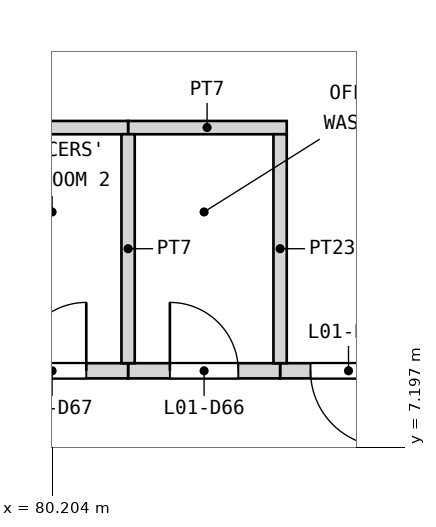
"""IFC4 building model, lengths in metres.
Left out: names, types, materials, properties, quantities, classifications, styles, units other than length and angle.
Written with IfcOpenShell. Run it as: python <this file> out.ifc"""

import sys

from ifc_helpers import new_model, si_unit, direction, frame, frame_2d, origin, place, context, subcontext, project, spatial, rectangle, extrude, element, fill, save


model = new_model("IFC4")
c1 = context("Model", 3, precision=1e-05, world=origin(), true_north=direction((0.0, 1.0)))
c2 = subcontext(c1, "Body", "Model", "MODEL_VIEW")
j1 = project(units=[si_unit("LENGTHUNIT", "METRE"), si_unit("PLANEANGLEUNIT", "RADIAN")], contexts=[c1])
p1 = place(None, origin())
s1 = spatial("IfcSite", under=j1, at=p1, CompositionType="ELEMENT")
p2 = place(p1, origin())
s2 = spatial("IfcBuilding", under=s1, at=p2, CompositionType="ELEMENT")
p3 = place(p2, frame((0.0, 0.0, 4.2)))
s3 = spatial("IfcBuildingStorey", under=s2, at=p3, CompositionType="ELEMENT", Elevation=4.2)
p4 = place(p3, frame((85.0, 8.2, 0.0), z_axis=(0.0, 0.0, 1.0), x_axis=(-1.0, 0.0, 0.0)))
e1 = element("IfcWall", 1, at=p4, inside=s3, PredefinedType="PARTITIONING", context=c2, shape_type="SweptSolid", body=[
    extrude(rectangle(XDim=1.8, YDim=0.2, at=frame_2d((0.9, 0.0))), origin(), (0.0, 0.0, 1.0), 3.9),
])
p5 = place(p4, frame((0.4, 0.0, 0.0)))
e2 = element("IfcOpeningElement", 2, at=p5, cuts=e1, PredefinedType="OPENING", context=c2, shape_type="SweptSolid", body=[
    extrude(rectangle(XDim=1.0, YDim=2.1, at=frame_2d((0.5, 1.05))), frame((0.0, 0.11, 0.0), z_axis=(0.0, -1.0, 0.0), x_axis=(1.0, 0.0, 0.0)), (0.0, 0.0, 1.0), 0.22),
])
p6 = place(p3, frame((83.2, 8.2, 0.0), z_axis=(0.0, 0.0, 1.0), x_axis=(-1.0, 0.0, 0.0)))
e3 = element("IfcWall", 3, at=p6, inside=s3, PredefinedType="PARTITIONING", context=c2, shape_type="SweptSolid", body=[
    extrude(rectangle(XDim=2.0, YDim=0.2, at=frame_2d((1.0, 0.0))), origin(), (0.0, 0.0, 1.0), 3.9),
])
p7 = place(p6, frame((0.55, 0.0, 0.0)))
e4 = element("IfcOpeningElement", 4, at=p7, cuts=e3, PredefinedType="OPENING", context=c2, shape_type="SweptSolid", body=[
    extrude(rectangle(XDim=0.9, YDim=2.1, at=frame_2d((0.45, 1.05))), frame((0.0, 0.11, 0.0), z_axis=(0.0, -1.0, 0.0), x_axis=(1.0, 0.0, 0.0)), (0.0, 0.0, 1.0), 0.22),
])
p8 = place(p3, frame((81.2, 8.2, 0.0), z_axis=(0.0, 0.0, 1.0), x_axis=(-1.0, 0.0, 0.0)))
e5 = element("IfcWall", 5, at=p8, inside=s3, PredefinedType="PARTITIONING", context=c2, shape_type="SweptSolid", body=[
    extrude(rectangle(XDim=2.0, YDim=0.2, at=frame_2d((1.0, 0.0))), origin(), (0.0, 0.0, 1.0), 3.9),
])
p9 = place(p8, frame((0.55, 0.0, 0.0)))
e6 = element("IfcOpeningElement", 6, at=p9, cuts=e5, PredefinedType="OPENING", context=c2, shape_type="SweptSolid", body=[
    extrude(rectangle(XDim=0.9, YDim=2.1, at=frame_2d((0.45, 1.05))), frame((0.0, 0.11, 0.0), z_axis=(0.0, -1.0, 0.0), x_axis=(1.0, 0.0, 0.0)), (0.0, 0.0, 1.0), 0.22),
])
p10 = place(p3, frame((83.288, 11.4, 0.0), z_axis=(0.0, 0.0, 1.0), x_axis=(-1.0, 0.0, 0.0)))
e7 = element("IfcWall", 7, at=p10, inside=s3, PredefinedType="PARTITIONING", context=c2, shape_type="SweptSolid", body=[
    extrude(rectangle(XDim=2.088, YDim=0.175, at=frame_2d((1.044, 0.0))), origin(), (0.0, 0.0, 1.0), 3.9),
])
p11 = place(p3, frame((81.2, 11.4, 0.0), z_axis=(0.0, 0.0, 1.0), x_axis=(-1.0, 0.0, 0.0)))
e8 = element("IfcWall", 8, at=p11, inside=s3, PredefinedType="PARTITIONING", context=c2, shape_type="SweptSolid", body=[
    extrude(rectangle(XDim=2.0, YDim=0.175, at=frame_2d((1.0, 0.0))), origin(), (0.0, 0.0, 1.0), 3.9),
])
p12 = place(p3, frame((83.2, 8.3, 0.0), z_axis=(0.0, 0.0, 1.0), x_axis=(0.0, 1.0, 0.0)))
e9 = element("IfcWall", 9, at=p12, inside=s3, PredefinedType="PARTITIONING", context=c2, shape_type="SweptSolid", body=[
    extrude(rectangle(XDim=3.012, YDim=0.175, at=frame_2d((1.506, 0.0))), origin(), (0.0, 0.0, 1.0), 2.9),
])
p13 = place(p3, frame((81.2, 8.3, 0.0), z_axis=(0.0, 0.0, 1.0), x_axis=(0.0, 1.0, 0.0)))
e10 = element("IfcWall", 10, at=p13, inside=s3, PredefinedType="PARTITIONING", context=c2, shape_type="SweptSolid", body=[
    extrude(rectangle(XDim=3.012, YDim=0.175, at=frame_2d((1.506, 0.0))), origin(), (0.0, 0.0, 1.0), 3.9),
])
p14 = place(p7, frame((0.9, 0.0, 0.0), z_axis=(0.0, 0.0, 1.0), x_axis=(-1.0, 0.0, 0.0)))
e11 = element("IfcDoor", 11, at=p14, inside=s3, OperationType="SINGLE_SWING_LEFT", PredefinedType="DOOR", context=c2, shape_type="SweptSolid", body=[
    extrude(rectangle(XDim=0.9, YDim=2.1, at=frame_2d((0.45, 1.05))), frame((0.0, 0.025, 0.0), z_axis=(0.0, -1.0, 0.0), x_axis=(1.0, 0.0, 0.0)), (0.0, 0.0, 1.0), 0.05),
])
fill(e4, e11)
p15 = place(p9, frame((0.9, 0.0, 0.0), z_axis=(0.0, 0.0, 1.0), x_axis=(-1.0, 0.0, 0.0)))
e12 = element("IfcDoor", 12, at=p15, inside=s3, OperationType="SINGLE_SWING_RIGHT", PredefinedType="DOOR", context=c2, shape_type="SweptSolid", body=[
    extrude(rectangle(XDim=0.9, YDim=2.1, at=frame_2d((0.45, 1.05))), frame((0.0, 0.025, 0.0), z_axis=(0.0, -1.0, 0.0), x_axis=(1.0, 0.0, 0.0)), (0.0, 0.0, 1.0), 0.05),
])
fill(e6, e12)
p16 = place(p5, origin())
e13 = element("IfcDoor", 13, at=p16, inside=s3, OperationType="SINGLE_SWING_LEFT", PredefinedType="DOOR", context=c2, shape_type="SweptSolid", body=[
    extrude(rectangle(XDim=1.0, YDim=2.1, at=frame_2d((0.5, 1.05))), frame((0.0, 0.025, 0.0), z_axis=(0.0, -1.0, 0.0), x_axis=(1.0, 0.0, 0.0)), (0.0, 0.0, 1.0), 0.05),
])
fill(e2, e13)
save(model, sys.argv[1])
